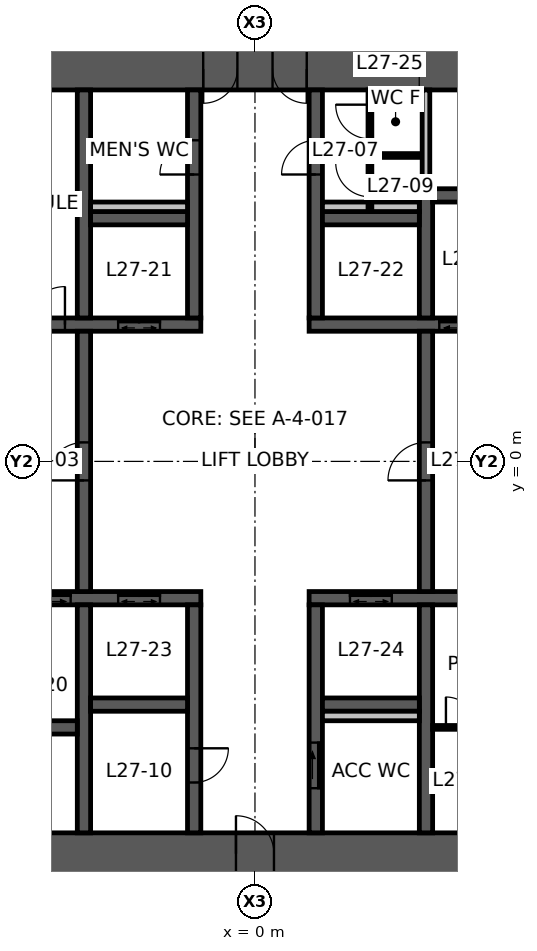
"""IFC4 building model, lengths in metres.
Left out: names, types, materials, properties, quantities, classifications, styles, units other than length and angle.
Written with IfcOpenShell. Run it as: python <this file> out.ifc"""

import sys

from ifc_helpers import new_model, si_unit, direction, frame, frame_2d, origin, place, context, subcontext, project, spatial, polyline, rectangle, outline, extrude, element, fill, save


model = new_model("IFC4")
c1 = context("Model", 3, precision=1e-05, world=origin(), true_north=direction((0.0, 1.0)))
c2 = subcontext(c1, "Body", "Model", "MODEL_VIEW")
j1 = project(units=[si_unit("LENGTHUNIT", "METRE"), si_unit("PLANEANGLEUNIT", "RADIAN")], contexts=[c1])
p1 = place(None, origin())
s1 = spatial("IfcSite", under=j1, at=p1, CompositionType="ELEMENT")
p2 = place(p1, origin())
s2 = spatial("IfcBuilding", under=s1, at=p2, CompositionType="ELEMENT")
p3 = place(p2, frame((0.0, 0.0, 108.0)))
s3 = spatial("IfcBuildingStorey", under=s2, at=p3, CompositionType="ELEMENT", Elevation=108.0)
p4 = place(p3, frame((5.961, 10.325, 0.0), z_axis=(0.0, 0.0, 1.0), x_axis=(-1.0, 0.0, 0.0)))
e1 = element("IfcWall", 1, at=p4, inside=s3, PredefinedType="SHEAR", context=c2, shape_type="SweptSolid", body=[
    extrude(outline(polyline([(-0.318, -0.55), (4.599, -0.55), (5.499, -0.55), (6.424, -0.55), (7.323, -0.55), (12.24, -0.55), (11.605, 0.55), (7.323, 0.55), (6.424, 0.55), (5.499, 0.55), (4.599, 0.55), (0.318, 0.55), (-0.318, -0.55)])), origin(), (0.0, 0.0, 1.0), 3.9),
])
p5 = place(p4, frame((6.424, 0.0, 0.0)))
e2 = element("IfcOpeningElement", 2, at=p5, cuts=e1, PredefinedType="OPENING", context=c2, shape_type="SweptSolid", body=[
    extrude(rectangle(XDim=0.9, YDim=2.1, at=frame_2d((0.45, 1.05))), frame((0.0, 0.56, 0.0), z_axis=(0.0, -1.0, 0.0), x_axis=(1.0, 0.0, 0.0)), (0.0, 0.0, 1.0), 1.12),
])
p6 = place(p4, frame((4.599, 0.0, 0.0)))
e3 = element("IfcOpeningElement", 3, at=p6, cuts=e1, PredefinedType="OPENING", context=c2, shape_type="SweptSolid", body=[
    extrude(rectangle(XDim=0.9, YDim=2.1, at=frame_2d((0.45, 1.05))), frame((0.0, 0.56, 0.0), z_axis=(0.0, -1.0, 0.0), x_axis=(1.0, 0.0, 0.0)), (0.0, 0.0, 1.0), 1.12),
])
p7 = place(p3, frame((-5.961, -10.325, 0.0), z_axis=(0.0, 0.0, 1.0), x_axis=(1.0, 0.0, 0.0)))
e4 = element("IfcWall", 4, at=p7, inside=s3, PredefinedType="SHEAR", context=c2, shape_type="SweptSolid", body=[
    extrude(outline(polyline([(-0.318, -0.55), (5.461, -0.55), (6.461, -0.55), (12.24, -0.55), (11.605, 0.55), (6.461, 0.55), (5.461, 0.55), (0.318, 0.55), (-0.318, -0.55)])), origin(), (0.0, 0.0, 1.0), 3.9),
])
p8 = place(p7, frame((5.461, 0.0, 0.0)))
e5 = element("IfcOpeningElement", 5, at=p8, cuts=e4, PredefinedType="OPENING", context=c2, shape_type="SweptSolid", body=[
    extrude(rectangle(XDim=1.0, YDim=2.1, at=frame_2d((0.5, 1.05))), frame((0.0, 0.56, 0.0), z_axis=(0.0, -1.0, 0.0), x_axis=(1.0, 0.0, 0.0)), (0.0, 0.0, 1.0), 1.12),
])
p9 = place(p3, frame((-9.209, 3.6, 0.0), z_axis=(0.0, 0.0, 1.0), x_axis=(1.0, 0.0, 0.0)))
e6 = element("IfcWall", 6, at=p9, inside=s3, PredefinedType="SHEAR", context=c2, shape_type="SweptSolid", body=[
    extrude(outline(polyline([(-0.101, -0.175), (3.209, -0.175), (4.209, -0.175), (5.609, -0.175), (6.709, -0.175), (7.784, -0.175), (7.784, 0.175), (6.709, 0.175), (5.609, 0.175), (4.209, 0.175), (3.209, 0.175), (0.101, 0.175), (-0.101, -0.175)])), origin(), (0.0, 0.0, 1.0), 3.9),
])
p10 = place(p9, frame((3.209, 0.0, 0.0)))
e7 = element("IfcOpeningElement", 7, at=p10, cuts=e6, PredefinedType="OPENING", context=c2, shape_type="SweptSolid", body=[
    extrude(rectangle(XDim=1.0, YDim=2.1, at=frame_2d((0.5, 1.05))), frame((0.0, 0.185, 0.0), z_axis=(0.0, -1.0, 0.0), x_axis=(1.0, 0.0, 0.0)), (0.0, 0.0, 1.0), 0.37),
])
p11 = place(p9, frame((5.609, 0.0, 0.0)))
e8 = element("IfcOpeningElement", 8, at=p11, cuts=e6, PredefinedType="OPENING", context=c2, shape_type="SweptSolid", body=[
    extrude(rectangle(XDim=1.1, YDim=2.1, at=frame_2d((0.55, 1.05))), frame((0.0, 0.185, 0.0), z_axis=(0.0, -1.0, 0.0), x_axis=(1.0, 0.0, 0.0)), (0.0, 0.0, 1.0), 0.37),
])
p12 = place(p3, frame((1.425, 3.6, 0.0), z_axis=(0.0, 0.0, 1.0), x_axis=(1.0, 0.0, 0.0)))
e9 = element("IfcWall", 9, at=p12, inside=s3, PredefinedType="SHEAR", context=c2, shape_type="SweptSolid", body=[
    extrude(outline(polyline([(0.0, -0.175), (3.425, -0.175), (4.725, -0.175), (7.885, -0.175), (7.683, 0.175), (4.725, 0.175), (3.425, 0.175), (0.0, 0.175), (0.0, -0.175)])), origin(), (0.0, 0.0, 1.0), 3.9),
])
p13 = place(p12, frame((3.425, 0.0, 0.0)))
e10 = element("IfcOpeningElement", 10, at=p13, cuts=e9, PredefinedType="OPENING", context=c2, shape_type="SweptSolid", body=[
    extrude(rectangle(XDim=1.3, YDim=2.1, at=frame_2d((0.65, 1.05))), frame((0.0, 0.185, 0.0), z_axis=(0.0, -1.0, 0.0), x_axis=(1.0, 0.0, 0.0)), (0.0, 0.0, 1.0), 0.37),
])
p14 = place(p3, frame((-9.209, -3.6, 0.0), z_axis=(0.0, 0.0, 1.0), x_axis=(1.0, 0.0, 0.0)))
e11 = element("IfcWall", 11, at=p14, inside=s3, PredefinedType="SHEAR", context=c2, shape_type="SweptSolid", body=[
    extrude(outline(polyline([(0.101, -0.175), (3.059, -0.175), (4.359, -0.175), (5.609, -0.175), (6.709, -0.175), (7.784, -0.175), (7.784, 0.175), (6.709, 0.175), (5.609, 0.175), (4.359, 0.175), (3.059, 0.175), (-0.101, 0.175), (0.101, -0.175)])), origin(), (0.0, 0.0, 1.0), 3.9),
])
p15 = place(p14, frame((5.609, 0.0, 0.0)))
e12 = element("IfcOpeningElement", 12, at=p15, cuts=e11, PredefinedType="OPENING", context=c2, shape_type="SweptSolid", body=[
    extrude(rectangle(XDim=1.1, YDim=2.1, at=frame_2d((0.55, 1.05))), frame((0.0, 0.185, 0.0), z_axis=(0.0, -1.0, 0.0), x_axis=(1.0, 0.0, 0.0)), (0.0, 0.0, 1.0), 0.37),
])
p16 = place(p14, frame((3.059, 0.0, 0.0)))
e13 = element("IfcOpeningElement", 13, at=p16, cuts=e11, PredefinedType="OPENING", context=c2, shape_type="SweptSolid", body=[
    extrude(rectangle(XDim=1.3, YDim=2.1, at=frame_2d((0.65, 1.05))), frame((0.0, 0.185, 0.0), z_axis=(0.0, -1.0, 0.0), x_axis=(1.0, 0.0, 0.0)), (0.0, 0.0, 1.0), 0.37),
])
p17 = place(p3, frame((1.425, -3.6, 0.0), z_axis=(0.0, 0.0, 1.0), x_axis=(1.0, 0.0, 0.0)))
e14 = element("IfcWall", 14, at=p17, inside=s3, PredefinedType="SHEAR", context=c2, shape_type="SweptSolid", body=[
    extrude(outline(polyline([(0.0, -0.175), (1.075, -0.175), (2.175, -0.175), (7.683, -0.175), (7.885, 0.175), (2.175, 0.175), (1.075, 0.175), (0.0, 0.175), (0.0, -0.175)])), origin(), (0.0, 0.0, 1.0), 3.9),
])
p18 = place(p17, frame((1.075, 0.0, 0.0)))
e15 = element("IfcOpeningElement", 15, at=p18, cuts=e14, PredefinedType="OPENING", context=c2, shape_type="SweptSolid", body=[
    extrude(rectangle(XDim=1.1, YDim=2.1, at=frame_2d((0.55, 1.05))), frame((0.0, 0.185, 0.0), z_axis=(0.0, -1.0, 0.0), x_axis=(1.0, 0.0, 0.0)), (0.0, 0.0, 1.0), 0.37),
])
p19 = place(p3, frame((-1.6, 3.775, 0.0), z_axis=(0.0, 0.0, 1.0), x_axis=(0.0, 1.0, 0.0)))
e16 = element("IfcWall", 16, at=p19, inside=s3, PredefinedType="SHEAR", context=c2, shape_type="SweptSolid", body=[
    extrude(rectangle(XDim=6.0, YDim=0.35, at=frame_2d((3.0, 0.0))), origin(), (0.0, 0.0, 1.0), 3.9),
])
p20 = place(p19, frame((3.775, 0.0, 0.0)))
e17 = element("IfcOpeningElement", 17, at=p20, cuts=e16, PredefinedType="OPENING", context=c2, shape_type="SweptSolid", body=[
    extrude(rectangle(XDim=0.9, YDim=2.1, at=frame_2d((0.45, 1.05))), frame((0.0, 0.185, 0.0), z_axis=(0.0, -1.0, 0.0), x_axis=(1.0, 0.0, 0.0)), (0.0, 0.0, 1.0), 0.37),
])
p21 = place(p3, frame((1.6, 3.775, 0.0), z_axis=(0.0, 0.0, 1.0), x_axis=(0.0, 1.0, 0.0)))
e18 = element("IfcWall", 18, at=p21, inside=s3, PredefinedType="SHEAR", context=c2, shape_type="SweptSolid", body=[
    extrude(rectangle(XDim=6.0, YDim=0.35, at=frame_2d((3.0, 0.0))), origin(), (0.0, 0.0, 1.0), 3.9),
])
p22 = place(p21, frame((3.775, 0.0, 0.0)))
e19 = element("IfcOpeningElement", 19, at=p22, cuts=e18, PredefinedType="OPENING", context=c2, shape_type="SweptSolid", body=[
    extrude(rectangle(XDim=0.9, YDim=2.1, at=frame_2d((0.45, 1.05))), frame((0.0, 0.185, 0.0), z_axis=(0.0, -1.0, 0.0), x_axis=(1.0, 0.0, 0.0)), (0.0, 0.0, 1.0), 0.37),
])
p23 = place(p3, frame((-1.6, -3.775, 0.0), z_axis=(0.0, 0.0, 1.0), x_axis=(0.0, -1.0, 0.0)))
e20 = element("IfcWall", 20, at=p23, inside=s3, PredefinedType="SHEAR", context=c2, shape_type="SweptSolid", body=[
    extrude(rectangle(XDim=6.0, YDim=0.35, at=frame_2d((3.0, 0.0))), origin(), (0.0, 0.0, 1.0), 3.9),
])
p24 = place(p23, frame((3.775, 0.0, 0.0)))
e21 = element("IfcOpeningElement", 21, at=p24, cuts=e20, PredefinedType="OPENING", context=c2, shape_type="SweptSolid", body=[
    extrude(rectangle(XDim=0.9, YDim=2.1, at=frame_2d((0.45, 1.05))), frame((0.0, 0.185, 0.0), z_axis=(0.0, -1.0, 0.0), x_axis=(1.0, 0.0, 0.0)), (0.0, 0.0, 1.0), 0.37),
])
p25 = place(p3, frame((1.6, -3.775, 0.0), z_axis=(0.0, 0.0, 1.0), x_axis=(0.0, -1.0, 0.0)))
e22 = element("IfcWall", 22, at=p25, inside=s3, PredefinedType="SHEAR", context=c2, shape_type="SweptSolid", body=[
    extrude(rectangle(XDim=6.0, YDim=0.35, at=frame_2d((3.0, 0.0))), origin(), (0.0, 0.0, 1.0), 3.9),
])
p26 = place(p25, frame((3.625, 0.0, 0.0)))
e23 = element("IfcOpeningElement", 23, at=p26, cuts=e22, PredefinedType="OPENING", context=c2, shape_type="SweptSolid", body=[
    extrude(rectangle(XDim=1.2, YDim=2.1, at=frame_2d((0.6, 1.05))), frame((0.0, 0.185, 0.0), z_axis=(0.0, -1.0, 0.0), x_axis=(1.0, 0.0, 0.0)), (0.0, 0.0, 1.0), 0.37),
])
p27 = place(p3, frame((-4.5, -3.425, 0.0), z_axis=(0.0, 0.0, 1.0), x_axis=(0.0, 1.0, 0.0)))
e24 = element("IfcWall", 24, at=p27, inside=s3, PredefinedType="SHEAR", context=c2, shape_type="SweptSolid", body=[
    extrude(rectangle(XDim=6.85, YDim=0.35, at=frame_2d((3.425, 0.0))), origin(), (0.0, 0.0, 1.0), 3.9),
])
p28 = place(p27, frame((2.925, 0.0, 0.0)))
e25 = element("IfcOpeningElement", 25, at=p28, cuts=e24, PredefinedType="OPENING", context=c2, shape_type="SweptSolid", body=[
    extrude(rectangle(XDim=1.0, YDim=2.1, at=frame_2d((0.5, 1.05))), frame((0.0, 0.185, 0.0), z_axis=(0.0, -1.0, 0.0), x_axis=(1.0, 0.0, 0.0)), (0.0, 0.0, 1.0), 0.37),
])
p29 = place(p3, frame((4.5, -3.425, 0.0), z_axis=(0.0, 0.0, 1.0), x_axis=(0.0, 1.0, 0.0)))
e26 = element("IfcWall", 26, at=p29, inside=s3, PredefinedType="SHEAR", context=c2, shape_type="SweptSolid", body=[
    extrude(rectangle(XDim=6.85, YDim=0.35, at=frame_2d((3.425, 0.0))), origin(), (0.0, 0.0, 1.0), 3.9),
])
p30 = place(p29, frame((2.925, 0.0, 0.0)))
e27 = element("IfcOpeningElement", 27, at=p30, cuts=e26, PredefinedType="OPENING", context=c2, shape_type="SweptSolid", body=[
    extrude(rectangle(XDim=1.0, YDim=2.1, at=frame_2d((0.5, 1.05))), frame((0.0, 0.185, 0.0), z_axis=(0.0, -1.0, 0.0), x_axis=(1.0, 0.0, 0.0)), (0.0, 0.0, 1.0), 0.37),
])
p31 = place(p3, frame((-4.5, 3.775, 0.0), z_axis=(0.0, 0.0, 1.0), x_axis=(0.0, 1.0, 0.0)))
e28 = element("IfcWall", 28, at=p31, inside=s3, PredefinedType="SHEAR", context=c2, shape_type="SweptSolid", body=[
    extrude(rectangle(XDim=6.0, YDim=0.35, at=frame_2d((3.0, 0.0))), origin(), (0.0, 0.0, 1.0), 3.9),
])
p32 = place(p3, frame((4.5, 3.775, 0.0), z_axis=(0.0, 0.0, 1.0), x_axis=(0.0, 1.0, 0.0)))
e29 = element("IfcWall", 29, at=p32, inside=s3, PredefinedType="SHEAR", context=c2, shape_type="SweptSolid", body=[
    extrude(rectangle(XDim=3.4, YDim=0.35, at=frame_2d((1.7, 0.0))), origin(), (0.0, 0.0, 1.0), 3.9),
])
for number, where, z_axis, x_axis in (
    (30, (-4.5, -3.775, 0.0), (0.0, 0.0, 1.0), (0.0, -1.0, 0.0)),
    (31, (4.5, -3.775, 0.0), (0.0, 0.0, 1.0), (0.0, -1.0, 0.0)),
):
    element("IfcWall", number, at=place(p3, frame(where, z_axis=z_axis, x_axis=x_axis)), inside=s3, PredefinedType="SHEAR", context=c2, shape_type="SweptSolid", body=[
        extrude(rectangle(XDim=6.0, YDim=0.35, at=frame_2d((3.0, 0.0))), origin(), (0.0, 0.0, 1.0), 3.9),
    ])
for number, where, z_axis, x_axis in (
    (32, (-4.325, 6.4, 0.0), (0.0, 0.0, 1.0), (1.0, 0.0, 0.0)),
    (33, (1.775, 6.4, 0.0), (0.0, 0.0, 1.0), (1.0, 0.0, 0.0)),
    (34, (-4.325, -6.4, 0.0), (0.0, 0.0, 1.0), (1.0, 0.0, 0.0)),
    (35, (1.775, -6.4, 0.0), (0.0, 0.0, 1.0), (1.0, 0.0, 0.0)),
):
    element("IfcWall", number, at=place(p3, frame(where, z_axis=z_axis, x_axis=x_axis)), inside=s3, PredefinedType="SHEAR", context=c2, shape_type="SweptSolid", body=[
        extrude(rectangle(XDim=2.55, YDim=0.35, at=frame_2d((1.275, 0.0))), origin(), (0.0, 0.0, 1.0), 3.9),
    ])
for number, where, z_axis, x_axis in (
    (36, (-6.925, -7.0, 0.0), (0.0, 0.0, 1.0), (1.0, 0.0, 0.0)),
    (37, (4.675, 7.0, 0.0), (0.0, 0.0, 1.0), (1.0, 0.0, 0.0)),
):
    element("IfcWall", number, at=place(p3, frame(where, z_axis=z_axis, x_axis=x_axis)), inside=s3, PredefinedType="SHEAR", context=c2, shape_type="SweptSolid", body=[
        extrude(rectangle(XDim=2.25, YDim=0.35, at=frame_2d((1.125, 0.0))), origin(), (0.0, 0.0, 1.0), 3.9),
    ])
p33 = place(p3, frame((4.5, 7.175, 0.0), z_axis=(0.0, 0.0, 1.0), x_axis=(0.0, 1.0, 0.0)))
e38 = element("IfcWall", 38, at=p33, inside=s3, PredefinedType="STANDARD", context=c2, shape_type="SweptSolid", body=[
    extrude(rectangle(XDim=2.6, YDim=0.2, at=frame_2d((1.3, 0.0))), origin(), (0.0, 0.0, 1.0), 3.9),
])
for number, where, z_axis, x_axis in (
    (39, (-4.325, 6.7, 0.0), (0.0, 0.0, 1.0), (1.0, 0.0, 0.0)),
    (40, (1.775, 6.7, 0.0), (0.0, 0.0, 1.0), (1.0, 0.0, 0.0)),
    (41, (1.775, -6.7, 0.0), (0.0, 0.0, 1.0), (1.0, 0.0, 0.0)),
):
    element("IfcWall", number, at=place(p3, frame(where, z_axis=z_axis, x_axis=x_axis)), inside=s3, PredefinedType="PLUMBINGWALL", context=c2, shape_type="SweptSolid", body=[
        extrude(rectangle(XDim=2.55, YDim=0.25, at=frame_2d((1.275, 0.0))), origin(), (0.0, 0.0, 1.0), 3.9),
    ])
p34 = place(p3, frame((3.025, 6.575, 0.0), z_axis=(0.0, 0.0, 1.0), x_axis=(0.0, 1.0, 0.0)))
e42 = element("IfcWall", 42, at=p34, inside=s3, PredefinedType="PARTITIONING", context=c2, shape_type="SweptSolid", body=[
    extrude(rectangle(XDim=3.2, YDim=0.1, at=frame_2d((1.6, 0.0))), origin(), (0.0, 0.0, 1.0), 2.95),
])
p35 = place(p34, frame((1.913, 0.0, 0.0)))
e43 = element("IfcOpeningElement", 43, at=p35, cuts=e42, PredefinedType="OPENING", context=c2, shape_type="SweptSolid", body=[
    extrude(rectangle(XDim=0.9, YDim=2.1, at=frame_2d((0.45, 1.05))), frame((0.0, 0.06, 0.0), z_axis=(0.0, -1.0, 0.0), x_axis=(1.0, 0.0, 0.0)), (0.0, 0.0, 1.0), 0.12),
])
p36 = place(p34, frame((0.387, 0.0, 0.0)))
e44 = element("IfcOpeningElement", 44, at=p36, cuts=e42, PredefinedType="OPENING", context=c2, shape_type="SweptSolid", body=[
    extrude(rectangle(XDim=0.9, YDim=2.1, at=frame_2d((0.45, 1.05))), frame((0.0, 0.06, 0.0), z_axis=(0.0, -1.0, 0.0), x_axis=(1.0, 0.0, 0.0)), (0.0, 0.0, 1.0), 0.12),
])
p37 = place(p3, frame((3.075, 8.05, 0.0), z_axis=(0.0, 0.0, 1.0), x_axis=(1.0, 0.0, 0.0)))
e45 = element("IfcWall", 45, at=p37, inside=s3, PredefinedType="PARTITIONING", context=c2, shape_type="SweptSolid", body=[
    extrude(rectangle(XDim=1.25, YDim=0.1, at=frame_2d((0.625, 0.0))), origin(), (0.0, 0.0, 1.0), 2.95),
])
p38 = place(p3, frame((4.675, -7.0, 0.0), z_axis=(0.0, 0.0, 1.0), x_axis=(1.0, 0.0, 0.0)))
e46 = element("IfcWall", 46, at=p38, inside=s3, PredefinedType="PARTITIONING", context=c2, shape_type="SweptSolid", body=[
    extrude(outline(polyline([(0.0, -0.05), (0.35, -0.05), (1.15, -0.05), (2.542, -0.05), (2.571, 0.0), (2.577, 0.05), (1.15, 0.05), (0.35, 0.05), (0.0, 0.05), (0.0, -0.05)])), origin(), (0.0, 0.0, 1.0), 2.95),
])
p39 = place(p38, frame((0.35, 0.0, 0.0)))
e47 = element("IfcOpeningElement", 47, at=p39, cuts=e46, PredefinedType="OPENING", context=c2, shape_type="SweptSolid", body=[
    extrude(rectangle(XDim=0.8, YDim=2.1, at=frame_2d((0.4, 1.05))), frame((0.0, 0.06, 0.0), z_axis=(0.0, -1.0, 0.0), x_axis=(1.0, 0.0, 0.0)), (0.0, 0.0, 1.0), 0.12),
])
p40 = place(p5, origin())
e48 = element("IfcDoor", 48, at=p40, inside=s3, OperationType="SINGLE_SWING_RIGHT", PredefinedType="DOOR", context=c2, shape_type="SweptSolid", body=[
    extrude(rectangle(XDim=0.9, YDim=2.1, at=frame_2d((0.45, 1.05))), frame((0.0, 0.025, 0.0), z_axis=(0.0, -1.0, 0.0), x_axis=(1.0, 0.0, 0.0)), (0.0, 0.0, 1.0), 0.05),
])
fill(e2, e48)
p41 = place(p6, origin())
e49 = element("IfcDoor", 49, at=p41, inside=s3, OperationType="SINGLE_SWING_LEFT", PredefinedType="DOOR", context=c2, shape_type="SweptSolid", body=[
    extrude(rectangle(XDim=0.9, YDim=2.1, at=frame_2d((0.45, 1.05))), frame((0.0, 0.025, 0.0), z_axis=(0.0, -1.0, 0.0), x_axis=(1.0, 0.0, 0.0)), (0.0, 0.0, 1.0), 0.05),
])
fill(e3, e49)
p42 = place(p8, origin())
e50 = element("IfcDoor", 50, at=p42, inside=s3, OperationType="SINGLE_SWING_LEFT", PredefinedType="DOOR", context=c2, shape_type="SweptSolid", body=[
    extrude(rectangle(XDim=1.0, YDim=2.1, at=frame_2d((0.5, 1.05))), frame((0.0, 0.025, 0.0), z_axis=(0.0, -1.0, 0.0), x_axis=(1.0, 0.0, 0.0)), (0.0, 0.0, 1.0), 0.05),
])
fill(e5, e50)
p43 = place(p30, origin())
e51 = element("IfcDoor", 51, at=p43, inside=s3, OperationType="SINGLE_SWING_LEFT", PredefinedType="DOOR", context=c2, shape_type="SweptSolid", body=[
    extrude(rectangle(XDim=1.0, YDim=2.1, at=frame_2d((0.5, 1.05))), frame((0.0, 0.025, 0.0), z_axis=(0.0, -1.0, 0.0), x_axis=(1.0, 0.0, 0.0)), (0.0, 0.0, 1.0), 0.05),
])
fill(e27, e51)
p44 = place(p28, origin())
e52 = element("IfcDoor", 52, at=p44, inside=s3, OperationType="SINGLE_SWING_LEFT", PredefinedType="DOOR", context=c2, shape_type="SweptSolid", body=[
    extrude(rectangle(XDim=1.0, YDim=2.1, at=frame_2d((0.5, 1.05))), frame((0.0, 0.025, 0.0), z_axis=(0.0, -1.0, 0.0), x_axis=(1.0, 0.0, 0.0)), (0.0, 0.0, 1.0), 0.05),
])
fill(e25, e52)
p45 = place(p10, origin())
e53 = element("IfcDoor", 53, at=p45, inside=s3, OperationType="SINGLE_SWING_RIGHT", PredefinedType="DOOR", context=c2, shape_type="SweptSolid", body=[
    extrude(rectangle(XDim=1.0, YDim=2.1, at=frame_2d((0.5, 1.05))), frame((0.0, 0.025, 0.0), z_axis=(0.0, -1.0, 0.0), x_axis=(1.0, 0.0, 0.0)), (0.0, 0.0, 1.0), 0.05),
])
fill(e7, e53)
p46 = place(p20, origin())
e54 = element("IfcDoor", 54, at=p46, inside=s3, OperationType="SINGLE_SWING_LEFT", PredefinedType="DOOR", context=c2, shape_type="SweptSolid", body=[
    extrude(rectangle(XDim=0.9, YDim=2.1, at=frame_2d((0.45, 1.05))), frame((0.0, 0.025, 0.0), z_axis=(0.0, -1.0, 0.0), x_axis=(1.0, 0.0, 0.0)), (0.0, 0.0, 1.0), 0.05),
])
fill(e17, e54)
p47 = place(p22, origin())
e55 = element("IfcDoor", 55, at=p47, inside=s3, OperationType="SINGLE_SWING_LEFT", PredefinedType="DOOR", context=c2, shape_type="SweptSolid", body=[
    extrude(rectangle(XDim=0.9, YDim=2.1, at=frame_2d((0.45, 1.05))), frame((0.0, 0.025, 0.0), z_axis=(0.0, -1.0, 0.0), x_axis=(1.0, 0.0, 0.0)), (0.0, 0.0, 1.0), 0.05),
])
fill(e19, e55)
p48 = place(p26, origin())
e56 = element("IfcDoor", 56, at=p48, inside=s3, OperationType="SLIDING_TO_LEFT", PredefinedType="DOOR", context=c2, shape_type="SweptSolid", body=[
    extrude(rectangle(XDim=1.2, YDim=2.1, at=frame_2d((0.6, 1.05))), frame((0.0, 0.025, 0.0), z_axis=(0.0, -1.0, 0.0), x_axis=(1.0, 0.0, 0.0)), (0.0, 0.0, 1.0), 0.05),
])
fill(e23, e56)
p49 = place(p24, origin())
e57 = element("IfcDoor", 57, at=p49, inside=s3, OperationType="SINGLE_SWING_LEFT", PredefinedType="DOOR", context=c2, shape_type="SweptSolid", body=[
    extrude(rectangle(XDim=0.9, YDim=2.1, at=frame_2d((0.45, 1.05))), frame((0.0, 0.025, 0.0), z_axis=(0.0, -1.0, 0.0), x_axis=(1.0, 0.0, 0.0)), (0.0, 0.0, 1.0), 0.05),
])
fill(e21, e57)
p50 = place(p35, origin())
e58 = element("IfcDoor", 58, at=p50, inside=s3, OperationType="SINGLE_SWING_RIGHT", PredefinedType="DOOR", context=c2, shape_type="SweptSolid", body=[
    extrude(rectangle(XDim=0.9, YDim=2.1, at=frame_2d((0.45, 1.05))), frame((0.0, 0.025, 0.0), z_axis=(0.0, -1.0, 0.0), x_axis=(1.0, 0.0, 0.0)), (0.0, 0.0, 1.0), 0.05),
])
fill(e43, e58)
p51 = place(p36, origin())
e59 = element("IfcDoor", 59, at=p51, inside=s3, OperationType="SINGLE_SWING_RIGHT", PredefinedType="DOOR", context=c2, shape_type="SweptSolid", body=[
    extrude(rectangle(XDim=0.9, YDim=2.1, at=frame_2d((0.45, 1.05))), frame((0.0, 0.025, 0.0), z_axis=(0.0, -1.0, 0.0), x_axis=(1.0, 0.0, 0.0)), (0.0, 0.0, 1.0), 0.05),
])
fill(e44, e59)
p52 = place(p39, origin())
e60 = element("IfcDoor", 60, at=p52, inside=s3, OperationType="SINGLE_SWING_LEFT", PredefinedType="DOOR", context=c2, shape_type="SweptSolid", body=[
    extrude(rectangle(XDim=0.8, YDim=2.1, at=frame_2d((0.4, 1.05))), frame((0.0, 0.025, 0.0), z_axis=(0.0, -1.0, 0.0), x_axis=(1.0, 0.0, 0.0)), (0.0, 0.0, 1.0), 0.05),
])
fill(e47, e60)
p53 = place(p18, origin())
e61 = element("IfcDoor", 61, at=p53, inside=s3, OperationType="DOUBLE_DOOR_SLIDING", PredefinedType="DOOR", context=c2, shape_type="SweptSolid", body=[
    extrude(rectangle(XDim=1.1, YDim=2.1, at=frame_2d((0.55, 1.05))), frame((0.0, 0.025, 0.0), z_axis=(0.0, -1.0, 0.0), x_axis=(1.0, 0.0, 0.0)), (0.0, 0.0, 1.0), 0.05),
])
fill(e15, e61)
p54 = place(p11, origin())
e62 = element("IfcDoor", 62, at=p54, inside=s3, OperationType="DOUBLE_DOOR_SLIDING", PredefinedType="DOOR", context=c2, shape_type="SweptSolid", body=[
    extrude(rectangle(XDim=1.1, YDim=2.1, at=frame_2d((0.55, 1.05))), frame((0.0, 0.025, 0.0), z_axis=(0.0, -1.0, 0.0), x_axis=(1.0, 0.0, 0.0)), (0.0, 0.0, 1.0), 0.05),
])
fill(e8, e62)
p55 = place(p15, origin())
e63 = element("IfcDoor", 63, at=p55, inside=s3, OperationType="DOUBLE_DOOR_SLIDING", PredefinedType="DOOR", context=c2, shape_type="SweptSolid", body=[
    extrude(rectangle(XDim=1.1, YDim=2.1, at=frame_2d((0.55, 1.05))), frame((0.0, 0.025, 0.0), z_axis=(0.0, -1.0, 0.0), x_axis=(1.0, 0.0, 0.0)), (0.0, 0.0, 1.0), 0.05),
])
fill(e12, e63)
p56 = place(p13, origin())
e64 = element("IfcDoor", 64, at=p56, inside=s3, OperationType="DOUBLE_DOOR_SLIDING", PredefinedType="DOOR", context=c2, shape_type="SweptSolid", body=[
    extrude(rectangle(XDim=1.3, YDim=2.1, at=frame_2d((0.65, 1.05))), frame((0.0, 0.025, 0.0), z_axis=(0.0, -1.0, 0.0), x_axis=(1.0, 0.0, 0.0)), (0.0, 0.0, 1.0), 0.05),
])
fill(e10, e64)
p57 = place(p16, origin())
e65 = element("IfcDoor", 65, at=p57, inside=s3, OperationType="DOUBLE_DOOR_SLIDING", PredefinedType="DOOR", context=c2, shape_type="SweptSolid", body=[
    extrude(rectangle(XDim=1.3, YDim=2.1, at=frame_2d((0.65, 1.05))), frame((0.0, 0.025, 0.0), z_axis=(0.0, -1.0, 0.0), x_axis=(1.0, 0.0, 0.0)), (0.0, 0.0, 1.0), 0.05),
])
fill(e13, e65)
save(model, sys.argv[1])
